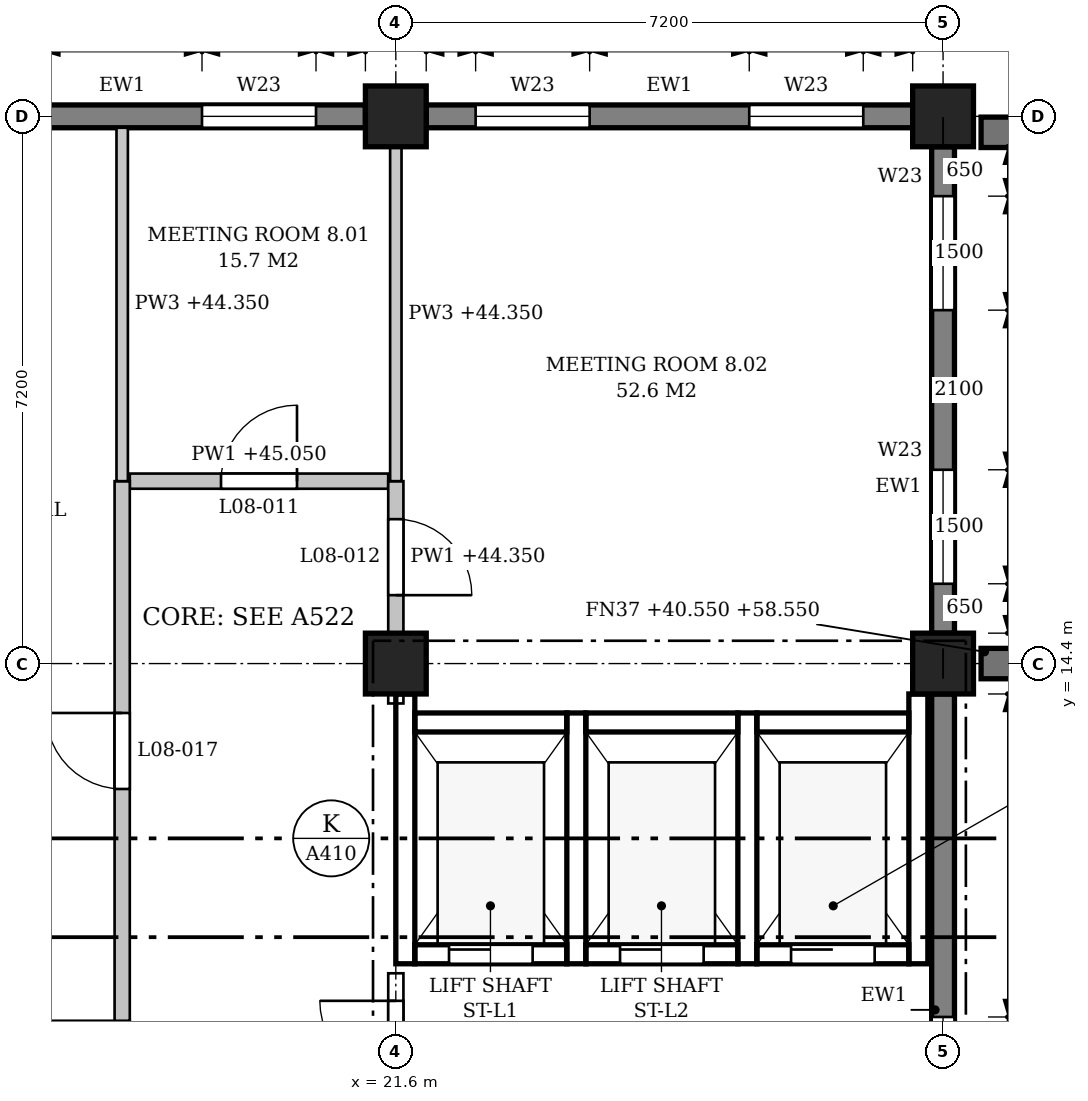
"""IFC4 building model, lengths in metres.
Left out: names, types, materials, properties, quantities, classifications, styles, units other than length and angle.
Written with IfcOpenShell. Run it as: python <this file> out.ifc"""

import sys

from ifc_helpers import new_model, si_unit, direction, frame, frame_2d, origin, origin_2d, place, context, subcontext, project, spatial, polyline, rectangle, outline, extrude, element, fill, save


model = new_model("IFC4")
c1 = context("Model", 3, precision=1e-05, world=origin(), true_north=direction((0.0, 1.0)))
c2 = subcontext(c1, "Body", "Model", "MODEL_VIEW")
j1 = project(units=[si_unit("LENGTHUNIT", "METRE"), si_unit("PLANEANGLEUNIT", "RADIAN")], contexts=[c1])
p1 = place(None, origin())
s1 = spatial("IfcSite", under=j1, at=p1, CompositionType="ELEMENT")
p2 = place(p1, origin())
s2 = spatial("IfcBuilding", under=s1, at=p2, CompositionType="ELEMENT")
p3 = place(p2, frame((0.0, 0.0, 40.8)))
s3 = spatial("IfcBuildingStorey", under=s2, at=p3, CompositionType="ELEMENT", Elevation=40.8)
for number, where, z_axis, x_axis in (
    (1, (21.6, 14.4, 0.0), (0.0, 0.0, 1.0), (1.0, 0.0, 0.0)),
    (2, (21.6, 21.6, 0.0), (0.0, 0.0, 1.0), (1.0, 0.0, 0.0)),
    (3, (28.8, 14.4, 0.0), (0.0, 0.0, 1.0), (1.0, 0.0, 0.0)),
    (4, (28.8, 21.6, 0.0), (0.0, 0.0, 1.0), (1.0, 0.0, 0.0)),
):
    element("IfcColumn", number, at=place(p3, frame(where, z_axis=z_axis, x_axis=x_axis)), inside=s3, PredefinedType="COLUMN", context=c2, shape_type="SweptSolid", body=[
        extrude(rectangle(XDim=0.8, YDim=0.8, at=origin_2d()), origin(), (0.0, 0.0, 1.0), 4.5),
    ])
p4 = place(p3, frame((28.8, 7.6, 0.0), z_axis=(0.0, 0.0, 1.0), x_axis=(0.0, 1.0, 0.0)))
e5 = element("IfcWall", 5, at=p4, inside=s3, PredefinedType="STANDARD", context=c2, shape_type="SweptSolid", body=[
    extrude(rectangle(XDim=6.4, YDim=0.3, at=frame_2d((3.2, 0.0))), origin(), (0.0, 0.0, 1.0), 3.65),
])
p5 = place(p4, frame((0.65, 0.0, 0.9)))
e6 = element("IfcOpeningElement", 6, at=p5, cuts=e5, PredefinedType="OPENING", context=c2, shape_type="SweptSolid", body=[
    extrude(outline(polyline([(0.0, 0.0), (1.5, 0.0), (1.5, 1.95), (0.75, 2.7), (0.0, 1.95), (0.0, 0.0)])), frame((0.0, 0.16, 0.0), z_axis=(0.0, -1.0, 0.0), x_axis=(1.0, 0.0, 0.0)), (0.0, 0.0, 1.0), 0.32),
])
p6 = place(p3, frame((28.8, 14.8, 0.0), z_axis=(0.0, 0.0, 1.0), x_axis=(0.0, 1.0, 0.0)))
e7 = element("IfcWall", 7, at=p6, inside=s3, PredefinedType="STANDARD", context=c2, shape_type="SweptSolid", body=[
    extrude(rectangle(XDim=6.4, YDim=0.3, at=frame_2d((3.2, 0.0))), origin(), (0.0, 0.0, 1.0), 3.65),
])
p7 = place(p6, frame((0.65, 0.0, 0.9)))
e8 = element("IfcOpeningElement", 8, at=p7, cuts=e7, PredefinedType="OPENING", context=c2, shape_type="SweptSolid", body=[
    extrude(outline(polyline([(0.0, 0.0), (1.5, 0.0), (1.5, 1.95), (0.75, 2.7), (0.0, 1.95), (0.0, 0.0)])), frame((0.0, 0.16, 0.0), z_axis=(0.0, -1.0, 0.0), x_axis=(1.0, 0.0, 0.0)), (0.0, 0.0, 1.0), 0.32),
])
p8 = place(p6, frame((4.25, 0.0, 0.9)))
e9 = element("IfcOpeningElement", 9, at=p8, cuts=e7, PredefinedType="OPENING", context=c2, shape_type="SweptSolid", body=[
    extrude(outline(polyline([(0.0, 0.0), (1.5, 0.0), (1.5, 1.95), (0.75, 2.7), (0.0, 1.95), (0.0, 0.0)])), frame((0.0, 0.16, 0.0), z_axis=(0.0, -1.0, 0.0), x_axis=(1.0, 0.0, 0.0)), (0.0, 0.0, 1.0), 0.32),
])
p9 = place(p3, frame((28.4, 21.6, 0.0), z_axis=(0.0, 0.0, 1.0), x_axis=(-1.0, 0.0, 0.0)))
e10 = element("IfcWall", 10, at=p9, inside=s3, PredefinedType="STANDARD", context=c2, shape_type="SweptSolid", body=[
    extrude(rectangle(XDim=6.4, YDim=0.3, at=frame_2d((3.2, 0.0))), origin(), (0.0, 0.0, 1.0), 3.65),
])
p10 = place(p9, frame((0.65, 0.0, 0.9)))
e11 = element("IfcOpeningElement", 11, at=p10, cuts=e10, PredefinedType="OPENING", context=c2, shape_type="SweptSolid", body=[
    extrude(outline(polyline([(0.0, 0.0), (1.5, 0.0), (1.5, 1.95), (0.75, 2.7), (0.0, 1.95), (0.0, 0.0)])), frame((0.0, 0.16, 0.0), z_axis=(0.0, -1.0, 0.0), x_axis=(1.0, 0.0, 0.0)), (0.0, 0.0, 1.0), 0.32),
])
p11 = place(p9, frame((4.25, 0.0, 0.9)))
e12 = element("IfcOpeningElement", 12, at=p11, cuts=e10, PredefinedType="OPENING", context=c2, shape_type="SweptSolid", body=[
    extrude(outline(polyline([(0.0, 0.0), (1.5, 0.0), (1.5, 1.95), (0.75, 2.7), (0.0, 1.95), (0.0, 0.0)])), frame((0.0, 0.16, 0.0), z_axis=(0.0, -1.0, 0.0), x_axis=(1.0, 0.0, 0.0)), (0.0, 0.0, 1.0), 0.32),
])
p12 = place(p3, frame((21.2, 21.6, 0.0), z_axis=(0.0, 0.0, 1.0), x_axis=(-1.0, 0.0, 0.0)))
e13 = element("IfcWall", 13, at=p12, inside=s3, PredefinedType="STANDARD", context=c2, shape_type="SweptSolid", body=[
    extrude(rectangle(XDim=6.4, YDim=0.3, at=frame_2d((3.2, 0.0))), origin(), (0.0, 0.0, 1.0), 3.65),
])
p13 = place(p12, frame((0.65, 0.0, 0.9)))
e14 = element("IfcOpeningElement", 14, at=p13, cuts=e13, PredefinedType="OPENING", context=c2, shape_type="SweptSolid", body=[
    extrude(outline(polyline([(0.0, 0.0), (1.5, 0.0), (1.5, 1.95), (0.75, 2.7), (0.0, 1.95), (0.0, 0.0)])), frame((0.0, 0.16, 0.0), z_axis=(0.0, -1.0, 0.0), x_axis=(1.0, 0.0, 0.0)), (0.0, 0.0, 1.0), 0.32),
])
p14 = place(p12, frame((4.25, 0.0, 0.9)))
e15 = element("IfcOpeningElement", 15, at=p14, cuts=e13, PredefinedType="OPENING", context=c2, shape_type="SweptSolid", body=[
    extrude(outline(polyline([(0.0, 0.0), (1.5, 0.0), (1.5, 1.95), (0.75, 2.7), (0.0, 1.95), (0.0, 0.0)])), frame((0.0, 0.16, 0.0), z_axis=(0.0, -1.0, 0.0), x_axis=(1.0, 0.0, 0.0)), (0.0, 0.0, 1.0), 0.32),
])
p15 = place(p3, frame((29.3, 14.4, -0.25), z_axis=(0.0, 0.0, 1.0), x_axis=(1.0, 0.0, 0.0)))
e16 = element("IfcWall", 16, at=p15, inside=s3, PredefinedType="POLYGONAL", context=c2, shape_type="SweptSolid", body=[
    extrude(outline(polyline([(0.55, 0.0), (0.55, 17.925), (0.5, 18.0), (0.0, 18.0), (0.0, 0.0), (0.55, 0.0)])), frame((0.0, 0.2, 0.0), z_axis=(0.0, -1.0, 0.0), x_axis=(1.0, 0.0, 0.0)), (0.0, 0.0, 1.0), 0.4),
])
p16 = place(p3, frame((29.3, 21.39, 0.0), z_axis=(0.0, 0.0, 1.0), x_axis=(1.0, 0.0, 0.0)))
e17 = element("IfcWall", 17, at=p16, inside=s3, PredefinedType="POLYGONAL", context=c2, shape_type="SweptSolid", body=[
    extrude(outline(polyline([(0.55, 0.0), (0.55, 17.675), (0.5, 17.75), (0.0, 17.75), (0.0, 0.0), (0.55, 0.0)])), frame((0.0, 0.2, 0.0), z_axis=(0.0, -1.0, 0.0), x_axis=(1.0, 0.0, 0.0)), (0.0, 0.0, 1.0), 0.4),
])
p17 = place(p3, frame((21.725, 10.45, -0.25), z_axis=(0.0, 0.0, 1.0), x_axis=(0.0, 1.0, 0.0)))
e18 = element("IfcWall", 18, at=p17, inside=s3, PredefinedType="SHEAR", context=c2, shape_type="SweptSolid", body=[
    extrude(rectangle(XDim=3.55, YDim=0.25, at=frame_2d((1.775, 0.0))), origin(), (0.0, 0.0, 1.0), 3.8),
])
for number, where, z_axis, x_axis in (
    (19, (23.975, 10.45, -0.25), (0.0, 0.0, 1.0), (0.0, 1.0, 0.0)),
    (20, (26.225, 10.45, -0.25), (0.0, 0.0, 1.0), (0.0, 1.0, 0.0)),
):
    element("IfcWall", number, at=place(p3, frame(where, z_axis=z_axis, x_axis=x_axis)), inside=s3, PredefinedType="SHEAR", context=c2, shape_type="SweptSolid", body=[
        extrude(rectangle(XDim=3.3, YDim=0.25, at=frame_2d((1.65, 0.0))), origin(), (0.0, 0.0, 1.0), 4.5),
    ])
p18 = place(p3, frame((28.475, 10.45, -0.25), z_axis=(0.0, 0.0, 1.0), x_axis=(0.0, 1.0, 0.0)))
e21 = element("IfcWall", 21, at=p18, inside=s3, PredefinedType="SHEAR", context=c2, shape_type="SweptSolid", body=[
    extrude(rectangle(XDim=3.55, YDim=0.25, at=frame_2d((1.775, 0.0))), origin(), (0.0, 0.0, 1.0), 4.5),
])
p19 = place(p3, frame((21.85, 10.575, -0.25), z_axis=(0.0, 0.0, 1.0), x_axis=(1.0, 0.0, 0.0)))
e22 = element("IfcWall", 22, at=p19, inside=s3, PredefinedType="SHEAR", context=c2, shape_type="SweptSolid", body=[
    extrude(rectangle(XDim=2.0, YDim=0.25, at=frame_2d((1.0, 0.0))), origin(), (0.0, 0.0, 1.0), 4.5),
])
p20 = place(p19, frame((0.45, 0.0, 0.25)))
e23 = element("IfcOpeningElement", 23, at=p20, cuts=e22, PredefinedType="OPENING", context=c2, shape_type="SweptSolid", body=[
    extrude(rectangle(XDim=1.1, YDim=2.1, at=frame_2d((0.55, 1.05))), frame((0.0, 0.135, 0.0), z_axis=(0.0, -1.0, 0.0), x_axis=(1.0, 0.0, 0.0)), (0.0, 0.0, 1.0), 0.27),
])
p21 = place(p3, frame((21.85, 13.625, -0.25), z_axis=(0.0, 0.0, 1.0), x_axis=(1.0, 0.0, 0.0)))
e24 = element("IfcWall", 24, at=p21, inside=s3, PredefinedType="SHEAR", context=c2, shape_type="SweptSolid", body=[
    extrude(rectangle(XDim=2.0, YDim=0.25, at=frame_2d((1.0, 0.0))), origin(), (0.0, 0.0, 1.0), 4.5),
])
p22 = place(p3, frame((24.1, 10.575, -0.25), z_axis=(0.0, 0.0, 1.0), x_axis=(1.0, 0.0, 0.0)))
e25 = element("IfcWall", 25, at=p22, inside=s3, PredefinedType="SHEAR", context=c2, shape_type="SweptSolid", body=[
    extrude(rectangle(XDim=2.0, YDim=0.25, at=frame_2d((1.0, 0.0))), origin(), (0.0, 0.0, 1.0), 4.5),
])
p23 = place(p22, frame((0.45, 0.0, 0.25)))
e26 = element("IfcOpeningElement", 26, at=p23, cuts=e25, PredefinedType="OPENING", context=c2, shape_type="SweptSolid", body=[
    extrude(rectangle(XDim=1.1, YDim=2.1, at=frame_2d((0.55, 1.05))), frame((0.0, 0.135, 0.0), z_axis=(0.0, -1.0, 0.0), x_axis=(1.0, 0.0, 0.0)), (0.0, 0.0, 1.0), 0.27),
])
p24 = place(p3, frame((24.1, 13.625, -0.25), z_axis=(0.0, 0.0, 1.0), x_axis=(1.0, 0.0, 0.0)))
e27 = element("IfcWall", 27, at=p24, inside=s3, PredefinedType="SHEAR", context=c2, shape_type="SweptSolid", body=[
    extrude(rectangle(XDim=2.0, YDim=0.25, at=frame_2d((1.0, 0.0))), origin(), (0.0, 0.0, 1.0), 4.5),
])
p25 = place(p3, frame((26.35, 10.575, -0.25), z_axis=(0.0, 0.0, 1.0), x_axis=(1.0, 0.0, 0.0)))
e28 = element("IfcWall", 28, at=p25, inside=s3, PredefinedType="SHEAR", context=c2, shape_type="SweptSolid", body=[
    extrude(rectangle(XDim=2.0, YDim=0.25, at=frame_2d((1.0, 0.0))), origin(), (0.0, 0.0, 1.0), 4.5),
])
p26 = place(p25, frame((0.45, 0.0, 0.25)))
e29 = element("IfcOpeningElement", 29, at=p26, cuts=e28, PredefinedType="OPENING", context=c2, shape_type="SweptSolid", body=[
    extrude(rectangle(XDim=1.1, YDim=2.1, at=frame_2d((0.55, 1.05))), frame((0.0, 0.135, 0.0), z_axis=(0.0, -1.0, 0.0), x_axis=(1.0, 0.0, 0.0)), (0.0, 0.0, 1.0), 0.27),
])
p27 = place(p3, frame((26.35, 13.625, -0.25), z_axis=(0.0, 0.0, 1.0), x_axis=(1.0, 0.0, 0.0)))
e30 = element("IfcWall", 30, at=p27, inside=s3, PredefinedType="SHEAR", context=c2, shape_type="SweptSolid", body=[
    extrude(rectangle(XDim=2.0, YDim=0.25, at=frame_2d((1.0, 0.0))), origin(), (0.0, 0.0, 1.0), 4.5),
])
p28 = place(p3, frame((3.5, 9.6, 0.0), z_axis=(0.0, 0.0, 1.0), x_axis=(1.0, 0.0, 0.0)))
e31 = element("IfcWall", 31, at=p28, inside=s3, PredefinedType="PARTITIONING", context=c2, shape_type="SweptSolid", body=[
    extrude(outline(polyline([(0.0, 0.0), (14.6, 0.0), (14.6, 4.25), (11.125, 4.25), (11.125, 3.55), (10.675, 3.55), (10.675, 4.25), (3.925, 4.25), (3.925, 3.55), (3.475, 3.55), (3.475, 4.25), (0.0, 4.25), (0.0, 0.0)])), frame((0.0, 0.1, 0.0), z_axis=(0.0, -1.0, 0.0), x_axis=(1.0, 0.0, 0.0)), (0.0, 0.0, 1.0), 0.2),
])
p29 = place(p28, frame((5.0, 0.0, 0.0)))
e32 = element("IfcOpeningElement", 32, at=p29, cuts=e31, PredefinedType="OPENING", context=c2, shape_type="SweptSolid", body=[
    extrude(rectangle(XDim=1.0, YDim=2.1, at=frame_2d((0.5, 1.05))), frame((0.0, 0.11, 0.0), z_axis=(0.0, -1.0, 0.0), x_axis=(1.0, 0.0, 0.0)), (0.0, 0.0, 1.0), 0.22),
])
p30 = place(p3, frame((18.1, 16.8, 0.0), z_axis=(0.0, 0.0, 1.0), x_axis=(1.0, 0.0, 0.0)))
e33 = element("IfcWall", 33, at=p30, inside=s3, PredefinedType="PARTITIONING", context=c2, shape_type="SweptSolid", body=[
    extrude(outline(polyline([(0.0, 0.0), (3.4, 0.0), (3.4, 3.55), (3.275, 3.55), (3.275, 4.25), (0.0, 4.25), (0.0, 0.0)])), frame((0.0, 0.1, 0.0), z_axis=(0.0, -1.0, 0.0), x_axis=(1.0, 0.0, 0.0)), (0.0, 0.0, 1.0), 0.2),
])
p31 = place(p30, frame((1.2, 0.0, 0.0)))
e34 = element("IfcOpeningElement", 34, at=p31, cuts=e33, PredefinedType="OPENING", context=c2, shape_type="SweptSolid", body=[
    extrude(rectangle(XDim=1.0, YDim=2.1, at=frame_2d((0.5, 1.05))), frame((0.0, 0.11, 0.0), z_axis=(0.0, -1.0, 0.0), x_axis=(1.0, 0.0, 0.0)), (0.0, 0.0, 1.0), 0.22),
])
p32 = place(p3, frame((18.0, 9.7, 0.0), z_axis=(0.0, 0.0, 1.0), x_axis=(0.0, 1.0, 0.0)))
e35 = element("IfcWall", 35, at=p32, inside=s3, PredefinedType="PARTITIONING", context=c2, shape_type="SweptSolid", body=[
    extrude(outline(polyline([(0.0, 0.0), (7.1, 0.0), (7.1, 4.25), (4.925, 4.25), (4.925, 3.55), (4.475, 3.55), (4.475, 4.25), (0.0, 4.25), (0.0, 0.0)])), frame((0.0, 0.1, 0.0), z_axis=(0.0, -1.0, 0.0), x_axis=(1.0, 0.0, 0.0)), (0.0, 0.0, 1.0), 0.2),
])
p33 = place(p32, frame((3.05, 0.0, 0.0)))
e36 = element("IfcOpeningElement", 36, at=p33, cuts=e35, PredefinedType="OPENING", context=c2, shape_type="SweptSolid", body=[
    extrude(rectangle(XDim=1.0, YDim=2.1, at=frame_2d((0.5, 1.05))), frame((0.0, 0.11, 0.0), z_axis=(0.0, -1.0, 0.0), x_axis=(1.0, 0.0, 0.0)), (0.0, 0.0, 1.0), 0.22),
])
p34 = place(p3, frame((18.0, 16.8, 0.0), z_axis=(0.0, 0.0, 1.0), x_axis=(0.0, 1.0, 0.0)))
e37 = element("IfcWall", 37, at=p34, inside=s3, PredefinedType="PARTITIONING", context=c2, shape_type="SweptSolid", body=[
    extrude(rectangle(XDim=4.65, YDim=0.15, at=frame_2d((2.325, 0.0))), origin(), (0.0, 0.0, 1.0), 3.55),
])
p35 = place(p3, frame((21.6, 7.6, 0.0), z_axis=(0.0, 0.0, 1.0), x_axis=(0.0, 1.0, 0.0)))
e38 = element("IfcWall", 38, at=p35, inside=s3, PredefinedType="PARTITIONING", context=c2, shape_type="SweptSolid", body=[
    extrude(rectangle(XDim=2.725, YDim=0.2, at=frame_2d((1.362, 0.0))), origin(), (0.0, 0.0, 1.0), 3.55),
])
p36 = place(p35, frame((0.362, 0.0, 0.0)))
e39 = element("IfcOpeningElement", 39, at=p36, cuts=e38, PredefinedType="OPENING", context=c2, shape_type="SweptSolid", body=[
    extrude(rectangle(XDim=2.0, YDim=2.4, at=frame_2d((1.0, 1.2))), frame((0.0, 0.11, 0.0), z_axis=(0.0, -1.0, 0.0), x_axis=(1.0, 0.0, 0.0)), (0.0, 0.0, 1.0), 0.22),
])
p37 = place(p3, frame((21.6, 13.875, 0.0), z_axis=(0.0, 0.0, 1.0), x_axis=(0.0, 1.0, 0.0)))
e40 = element("IfcWall", 40, at=p37, inside=s3, PredefinedType="PARTITIONING", context=c2, shape_type="SweptSolid", body=[
    extrude(rectangle(XDim=0.125, YDim=0.2, at=frame_2d((0.062, 0.0))), origin(), (0.0, 0.0, 1.0), 3.55),
])
p38 = place(p3, frame((21.6, 14.8, 0.0), z_axis=(0.0, 0.0, 1.0), x_axis=(0.0, 1.0, 0.0)))
e41 = element("IfcWall", 41, at=p38, inside=s3, PredefinedType="PARTITIONING", context=c2, shape_type="SweptSolid", body=[
    extrude(rectangle(XDim=2.0, YDim=0.2, at=frame_2d((1.0, 0.0))), origin(), (0.0, 0.0, 1.0), 3.55),
])
p39 = place(p38, frame((0.5, 0.0, 0.0)))
e42 = element("IfcOpeningElement", 42, at=p39, cuts=e41, PredefinedType="OPENING", context=c2, shape_type="SweptSolid", body=[
    extrude(rectangle(XDim=1.0, YDim=2.1, at=frame_2d((0.5, 1.05))), frame((0.0, 0.11, 0.0), z_axis=(0.0, -1.0, 0.0), x_axis=(1.0, 0.0, 0.0)), (0.0, 0.0, 1.0), 0.22),
])
p40 = place(p3, frame((21.6, 16.8, 0.0), z_axis=(0.0, 0.0, 1.0), x_axis=(0.0, 1.0, 0.0)))
e43 = element("IfcWall", 43, at=p40, inside=s3, PredefinedType="PARTITIONING", context=c2, shape_type="SweptSolid", body=[
    extrude(rectangle(XDim=4.4, YDim=0.15, at=frame_2d((2.2, 0.0))), origin(), (0.0, 0.0, 1.0), 3.55),
])
p41 = place(p5, origin())
e44 = element("IfcWindow", 44, at=p41, inside=s3, PartitioningType="SINGLE_PANEL", PredefinedType="WINDOW", context=c2, shape_type="SweptSolid", body=[
    extrude(outline(polyline([(0.0, 0.0), (1.5, 0.0), (1.5, 1.95), (0.75, 2.7), (0.0, 1.95), (0.0, 0.0)])), frame((0.0, 0.03, 0.0), z_axis=(0.0, -1.0, 0.0), x_axis=(1.0, 0.0, 0.0)), (0.0, 0.0, 1.0), 0.06),
])
fill(e6, e44)
p42 = place(p7, origin())
e45 = element("IfcWindow", 45, at=p42, inside=s3, PartitioningType="SINGLE_PANEL", PredefinedType="WINDOW", context=c2, shape_type="SweptSolid", body=[
    extrude(outline(polyline([(0.0, 0.0), (1.5, 0.0), (1.5, 1.95), (0.75, 2.7), (0.0, 1.95), (0.0, 0.0)])), frame((0.0, 0.03, 0.0), z_axis=(0.0, -1.0, 0.0), x_axis=(1.0, 0.0, 0.0)), (0.0, 0.0, 1.0), 0.06),
])
fill(e8, e45)
p43 = place(p8, origin())
e46 = element("IfcWindow", 46, at=p43, inside=s3, PartitioningType="SINGLE_PANEL", PredefinedType="WINDOW", context=c2, shape_type="SweptSolid", body=[
    extrude(outline(polyline([(0.0, 0.0), (1.5, 0.0), (1.5, 1.95), (0.75, 2.7), (0.0, 1.95), (0.0, 0.0)])), frame((0.0, 0.03, 0.0), z_axis=(0.0, -1.0, 0.0), x_axis=(1.0, 0.0, 0.0)), (0.0, 0.0, 1.0), 0.06),
])
fill(e9, e46)
p44 = place(p10, origin())
e47 = element("IfcWindow", 47, at=p44, inside=s3, PartitioningType="SINGLE_PANEL", PredefinedType="WINDOW", context=c2, shape_type="SweptSolid", body=[
    extrude(outline(polyline([(0.0, 0.0), (1.5, 0.0), (1.5, 1.95), (0.75, 2.7), (0.0, 1.95), (0.0, 0.0)])), frame((0.0, 0.03, 0.0), z_axis=(0.0, -1.0, 0.0), x_axis=(1.0, 0.0, 0.0)), (0.0, 0.0, 1.0), 0.06),
])
fill(e11, e47)
p45 = place(p11, origin())
e48 = element("IfcWindow", 48, at=p45, inside=s3, PartitioningType="SINGLE_PANEL", PredefinedType="WINDOW", context=c2, shape_type="SweptSolid", body=[
    extrude(outline(polyline([(0.0, 0.0), (1.5, 0.0), (1.5, 1.95), (0.75, 2.7), (0.0, 1.95), (0.0, 0.0)])), frame((0.0, 0.03, 0.0), z_axis=(0.0, -1.0, 0.0), x_axis=(1.0, 0.0, 0.0)), (0.0, 0.0, 1.0), 0.06),
])
fill(e12, e48)
p46 = place(p13, origin())
e49 = element("IfcWindow", 49, at=p46, inside=s3, PartitioningType="SINGLE_PANEL", PredefinedType="WINDOW", context=c2, shape_type="SweptSolid", body=[
    extrude(outline(polyline([(0.0, 0.0), (1.5, 0.0), (1.5, 1.95), (0.75, 2.7), (0.0, 1.95), (0.0, 0.0)])), frame((0.0, 0.03, 0.0), z_axis=(0.0, -1.0, 0.0), x_axis=(1.0, 0.0, 0.0)), (0.0, 0.0, 1.0), 0.06),
])
fill(e14, e49)
p47 = place(p20, origin())
e50 = element("IfcDoor", 50, at=p47, inside=s3, OperationType="SLIDING_TO_LEFT", PredefinedType="DOOR", context=c2, shape_type="SweptSolid", body=[
    extrude(rectangle(XDim=1.1, YDim=2.1, at=frame_2d((0.55, 1.05))), frame((0.0, 0.025, 0.0), z_axis=(0.0, -1.0, 0.0), x_axis=(1.0, 0.0, 0.0)), (0.0, 0.0, 1.0), 0.05),
])
fill(e23, e50)
p48 = place(p23, origin())
e51 = element("IfcDoor", 51, at=p48, inside=s3, OperationType="SLIDING_TO_LEFT", PredefinedType="DOOR", context=c2, shape_type="SweptSolid", body=[
    extrude(rectangle(XDim=1.1, YDim=2.1, at=frame_2d((0.55, 1.05))), frame((0.0, 0.025, 0.0), z_axis=(0.0, -1.0, 0.0), x_axis=(1.0, 0.0, 0.0)), (0.0, 0.0, 1.0), 0.05),
])
fill(e26, e51)
p49 = place(p26, origin())
e52 = element("IfcDoor", 52, at=p49, inside=s3, OperationType="SLIDING_TO_LEFT", PredefinedType="DOOR", context=c2, shape_type="SweptSolid", body=[
    extrude(rectangle(XDim=1.1, YDim=2.1, at=frame_2d((0.55, 1.05))), frame((0.0, 0.025, 0.0), z_axis=(0.0, -1.0, 0.0), x_axis=(1.0, 0.0, 0.0)), (0.0, 0.0, 1.0), 0.05),
])
fill(e29, e52)
p50 = place(p36, origin())
e53 = element("IfcDoor", 53, at=p50, inside=s3, OperationType="DOUBLE_DOOR_SINGLE_SWING", PredefinedType="DOOR", context=c2, shape_type="SweptSolid", body=[
    extrude(rectangle(XDim=2.0, YDim=2.4, at=frame_2d((1.0, 1.2))), frame((0.0, 0.025, 0.0), z_axis=(0.0, -1.0, 0.0), x_axis=(1.0, 0.0, 0.0)), (0.0, 0.0, 1.0), 0.05),
])
fill(e39, e53)
p51 = place(p31, origin())
e54 = element("IfcDoor", 54, at=p51, inside=s3, OperationType="SINGLE_SWING_RIGHT", PredefinedType="DOOR", context=c2, shape_type="SweptSolid", body=[
    extrude(rectangle(XDim=1.0, YDim=2.1, at=frame_2d((0.5, 1.05))), frame((0.0, 0.025, 0.0), z_axis=(0.0, -1.0, 0.0), x_axis=(1.0, 0.0, 0.0)), (0.0, 0.0, 1.0), 0.05),
])
fill(e34, e54)
p52 = place(p39, frame((1.0, 0.0, 0.0), z_axis=(0.0, 0.0, 1.0), x_axis=(-1.0, 0.0, 0.0)))
e55 = element("IfcDoor", 55, at=p52, inside=s3, OperationType="SINGLE_SWING_RIGHT", PredefinedType="DOOR", context=c2, shape_type="SweptSolid", body=[
    extrude(rectangle(XDim=1.0, YDim=2.1, at=frame_2d((0.5, 1.05))), frame((0.0, 0.025, 0.0), z_axis=(0.0, -1.0, 0.0), x_axis=(1.0, 0.0, 0.0)), (0.0, 0.0, 1.0), 0.05),
])
fill(e42, e55)
p53 = place(p33, origin())
e56 = element("IfcDoor", 56, at=p53, inside=s3, OperationType="SINGLE_SWING_RIGHT", PredefinedType="DOOR", context=c2, shape_type="SweptSolid", body=[
    extrude(rectangle(XDim=1.0, YDim=2.1, at=frame_2d((0.5, 1.05))), frame((0.0, 0.025, 0.0), z_axis=(0.0, -1.0, 0.0), x_axis=(1.0, 0.0, 0.0)), (0.0, 0.0, 1.0), 0.05),
])
fill(e36, e56)
save(model, sys.argv[1])
